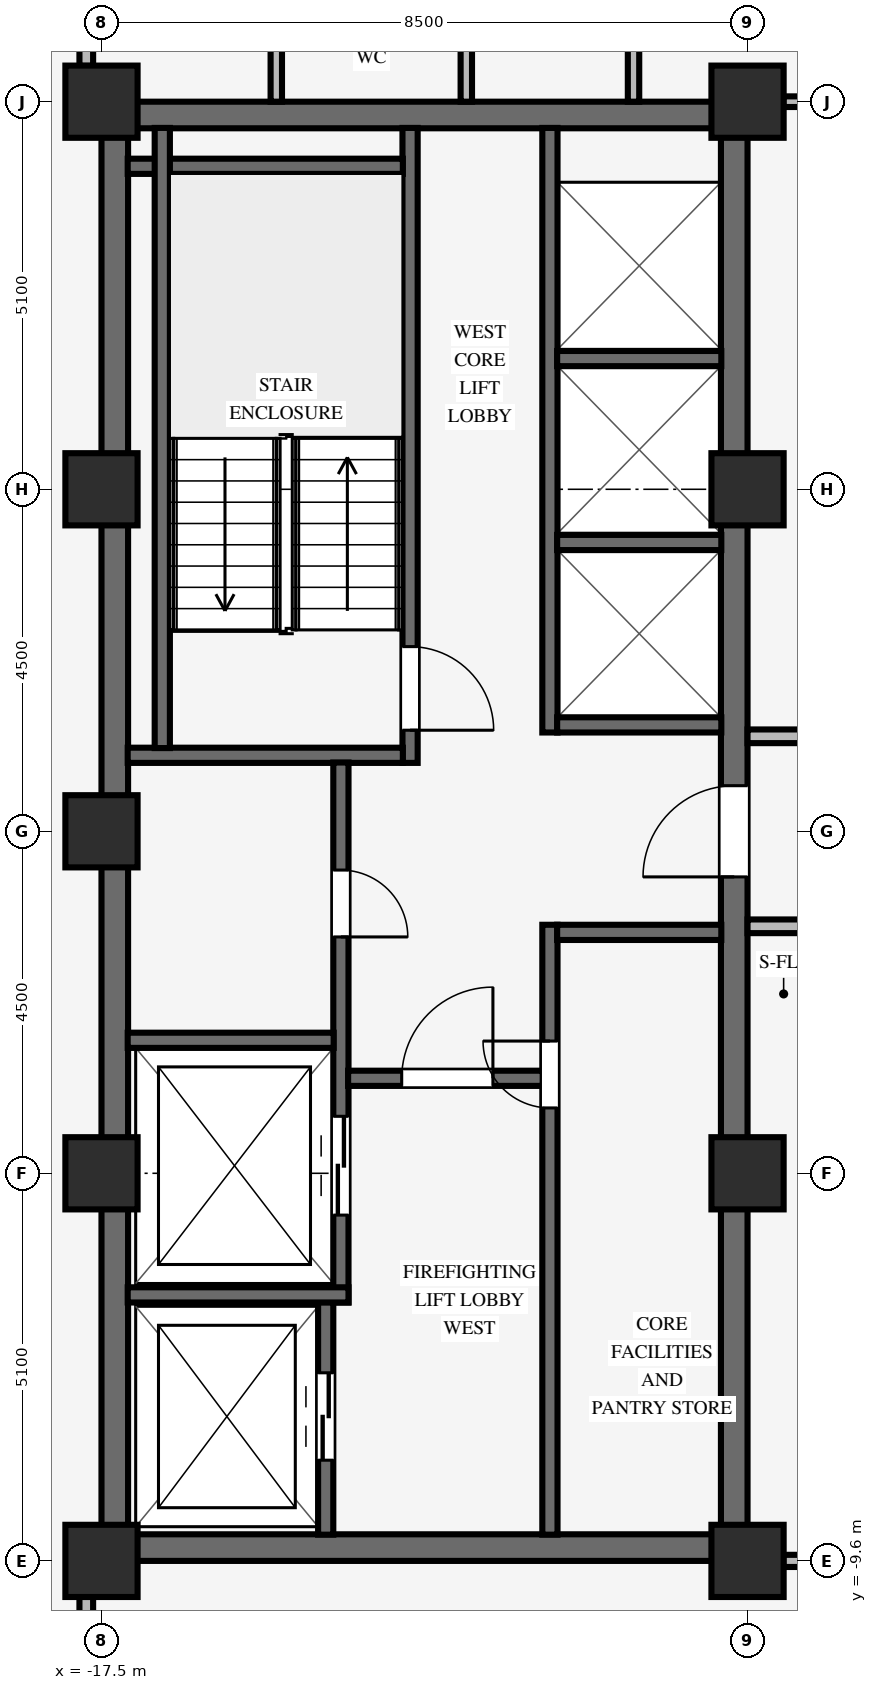
"""IFC4 building model, lengths in metres.
Left out: names, types, materials, properties, quantities, classifications, styles, units other than length and angle.
Written with IfcOpenShell. Run it as: python <this file> out.ifc"""

import sys

from ifc_helpers import new_model, si_unit, direction, frame, frame_2d, origin, origin_2d, place, context, subcontext, project, spatial, rectangle, extrude, source, transform, mapped, element, fill, save


model = new_model("IFC4")
c1 = context("Model", 3, precision=1e-05, world=origin(), true_north=direction((0.0, 1.0)))
c2 = subcontext(c1, "Body", "Model", "MODEL_VIEW")
j1 = project(units=[si_unit("LENGTHUNIT", "METRE"), si_unit("PLANEANGLEUNIT", "RADIAN")], contexts=[c1])
p1 = place(None, origin())
s1 = spatial("IfcSite", under=j1, at=p1, CompositionType="ELEMENT")
p2 = place(p1, origin())
s2 = spatial("IfcBuilding", under=s1, at=p2, CompositionType="ELEMENT")
p3 = place(p2, frame((0.0, 0.0, 198.2)))
s3 = spatial("IfcBuildingStorey", under=s2, at=p3, CompositionType="ELEMENT", Elevation=198.2)
for number, where, z_axis, x_axis in (
    (1, (-17.5, -9.425, 0.0), (0.0, 0.0, 1.0), (1.0, 0.0, 0.0)),
    (2, (-17.5, 9.425, 0.0), (0.0, 0.0, 1.0), (1.0, 0.0, 0.0)),
):
    element("IfcWall", number, at=place(p3, frame(where, z_axis=z_axis, x_axis=x_axis)), inside=s3, PredefinedType="SHEAR", context=c2, shape_type="SweptSolid", body=[
        extrude(rectangle(XDim=8.5, YDim=0.35, at=frame_2d((4.25, 0.0))), origin(), (0.0, 0.0, 1.0), 3.37),
    ])
p4 = place(p3, frame((-17.325, -9.255, 0.0), z_axis=(0.0, 0.0, 1.0), x_axis=(0.0, 1.0, 0.0)))
e3 = element("IfcWall", 3, at=p4, inside=s3, PredefinedType="SHEAR", context=c2, shape_type="SweptSolid", body=[
    extrude(rectangle(XDim=18.51, YDim=0.35, at=frame_2d((9.255, 0.0))), origin(), (0.0, 0.0, 1.0), 3.37),
])
p5 = place(p3, frame((-9.175, -9.255, 0.0), z_axis=(0.0, 0.0, 1.0), x_axis=(0.0, 1.0, 0.0)))
e4 = element("IfcWall", 4, at=p5, inside=s3, PredefinedType="SHEAR", context=c2, shape_type="SweptSolid", body=[
    extrude(rectangle(XDim=18.51, YDim=0.35, at=frame_2d((9.255, 0.0))), origin(), (0.0, 0.0, 1.0), 3.37),
])
p6 = place(p5, frame((8.655, 0.0, 0.0)))
e5 = element("IfcOpeningElement", 5, at=p6, cuts=e4, PredefinedType="OPENING", context=c2, shape_type="SweptSolid", body=[
    extrude(rectangle(XDim=1.2, YDim=2.15, at=frame_2d((0.6, 1.075))), frame((0.0, 0.185, 0.0), z_axis=(0.0, -1.0, 0.0), x_axis=(1.0, 0.0, 0.0)), (0.0, 0.0, 1.0), 0.37),
])
for number, where, z_axis, x_axis in (
    (6, (-17.5, -9.6, 0.0), (0.0, 0.0, 1.0), (1.0, 0.0, 0.0)),
    (7, (-17.5, -4.5, 0.0), (0.0, 0.0, 1.0), (1.0, 0.0, 0.0)),
    (8, (-17.5, 4.5, 0.0), (0.0, 0.0, 1.0), (1.0, 0.0, 0.0)),
    (9, (-17.5, 9.6, 0.0), (0.0, 0.0, 1.0), (1.0, 0.0, 0.0)),
    (10, (-9.0, -9.6, 0.0), (0.0, 0.0, 1.0), (1.0, 0.0, 0.0)),
    (11, (-9.0, -4.5, 0.0), (0.0, 0.0, 1.0), (1.0, 0.0, 0.0)),
    (12, (-9.0, 4.5, 0.0), (0.0, 0.0, 1.0), (1.0, 0.0, 0.0)),
    (13, (-9.0, 9.6, 0.0), (0.0, 0.0, 1.0), (1.0, 0.0, 0.0)),
    (14, (-17.5, 0.0, 0.0), (0.0, 0.0, 1.0), (1.0, 0.0, 0.0)),
):
    element("IfcColumn", number, at=place(p3, frame(where, z_axis=z_axis, x_axis=x_axis)), inside=s3, PredefinedType="COLUMN", context=c2, shape_type="SweptSolid", body=[
        extrude(rectangle(XDim=0.95, YDim=0.95, at=origin_2d()), origin(), (0.0, 0.0, 1.0), 3.37),
    ])
p7 = place(p3, frame((-13.44, 0.9, 0.0), z_axis=(0.0, 0.0, 1.0), x_axis=(0.0, 1.0, 0.0)))
e15 = element("IfcWall", 15, at=p7, inside=s3, PredefinedType="SHEAR", context=c2, shape_type="SweptSolid", body=[
    extrude(rectangle(XDim=8.355, YDim=0.2, at=frame_2d((4.177, 0.0))), origin(), (0.0, 0.0, 1.0), 3.37),
])
p8 = place(p7, frame((1.53, 0.0, 0.0), z_axis=(0.0, 0.0, 1.0), x_axis=(-1.0, 0.0, 0.0)))
e16 = element("IfcOpeningElement", 16, at=p8, cuts=e15, PredefinedType="OPENING", context=c2, shape_type="SweptSolid", body=[
    extrude(rectangle(XDim=1.1, YDim=2.15, at=frame_2d((0.55, 1.075))), frame((0.0, 0.11, 0.0), z_axis=(0.0, -1.0, 0.0), x_axis=(1.0, 0.0, 0.0)), (0.0, 0.0, 1.0), 0.22),
])
for number, where, z_axis, x_axis in (
    (17, (-17.155, 1.0, 0.0), (0.0, 0.0, 1.0), (1.0, 0.0, 0.0)),
    (18, (-17.155, 8.75, 0.0), (0.0, 0.0, 1.0), (1.0, 0.0, 0.0)),
):
    element("IfcWall", number, at=place(p3, frame(where, z_axis=z_axis, x_axis=x_axis)), inside=s3, PredefinedType="SHEAR", context=c2, shape_type="SweptSolid", body=[
        extrude(rectangle(XDim=3.62, YDim=0.2, at=frame_2d((1.81, 0.0))), origin(), (0.0, 0.0, 1.0), 3.37),
    ])
p9 = place(p3, frame((-16.7, 1.095, 0.0), z_axis=(0.0, 0.0, 1.0), x_axis=(0.0, 1.0, 0.0)))
e19 = element("IfcWall", 19, at=p9, inside=s3, PredefinedType="SHEAR", context=c2, shape_type="SweptSolid", body=[
    extrude(rectangle(XDim=8.16, YDim=0.2, at=frame_2d((4.08, 0.0))), origin(), (0.0, 0.0, 1.0), 3.37),
])
p10 = place(p3, frame((-14.55, -9.255, 0.0), z_axis=(0.0, 0.0, 1.0), x_axis=(0.0, 1.0, 0.0)))
e20 = element("IfcWall", 20, at=p10, inside=s3, PredefinedType="SHEAR", context=c2, shape_type="SweptSolid", body=[
    extrude(rectangle(XDim=3.06, YDim=0.2, at=frame_2d((1.53, 0.0))), origin(), (0.0, 0.0, 1.0), 3.37),
])
p11 = place(p10, frame((0.98, 0.0, 0.0)))
e21 = element("IfcOpeningElement", 21, at=p11, cuts=e20, PredefinedType="OPENING", context=c2, shape_type="SweptSolid", body=[
    extrude(rectangle(XDim=1.15, YDim=2.15, at=frame_2d((0.575, 1.075))), frame((0.0, 0.11, 0.0), z_axis=(0.0, -1.0, 0.0), x_axis=(1.0, 0.0, 0.0)), (0.0, 0.0, 1.0), 0.22),
])
p12 = place(p3, frame((-14.35, -6.2, 0.0), z_axis=(0.0, 0.0, 1.0), x_axis=(0.0, 1.0, 0.0)))
e22 = element("IfcWall", 22, at=p12, inside=s3, PredefinedType="SHEAR", context=c2, shape_type="SweptSolid", body=[
    extrude(rectangle(XDim=7.105, YDim=0.2, at=frame_2d((3.552, 0.0))), origin(), (0.0, 0.0, 1.0), 3.37),
])
p13 = place(p12, frame((5.69, 0.0, 0.0), z_axis=(0.0, 0.0, 1.0), x_axis=(-1.0, 0.0, 0.0)))
e23 = element("IfcOpeningElement", 23, at=p13, cuts=e22, PredefinedType="OPENING", context=c2, shape_type="SweptSolid", body=[
    extrude(rectangle(XDim=0.88, YDim=2.1, at=frame_2d((0.44, 1.05))), frame((0.0, 0.11, 0.0), z_axis=(0.0, -1.0, 0.0), x_axis=(1.0, 0.0, 0.0)), (0.0, 0.0, 1.0), 0.22),
])
p14 = place(p12, frame((1.15, 0.0, 0.0)))
e24 = element("IfcOpeningElement", 24, at=p14, cuts=e22, PredefinedType="OPENING", context=c2, shape_type="SweptSolid", body=[
    extrude(rectangle(XDim=1.3, YDim=2.2, at=frame_2d((0.65, 1.1))), frame((0.0, 0.11, 0.0), z_axis=(0.0, -1.0, 0.0), x_axis=(1.0, 0.0, 0.0)), (0.0, 0.0, 1.0), 0.22),
])
p15 = place(p3, frame((-17.155, -6.1, 0.0), z_axis=(0.0, 0.0, 1.0), x_axis=(1.0, 0.0, 0.0)))
e25 = element("IfcWall", 25, at=p15, inside=s3, PredefinedType="SHEAR", context=c2, shape_type="SweptSolid", body=[
    extrude(rectangle(XDim=2.905, YDim=0.2, at=frame_2d((1.453, 0.0))), origin(), (0.0, 0.0, 1.0), 3.37),
])
p16 = place(p3, frame((-17.155, -2.75, 0.0), z_axis=(0.0, 0.0, 1.0), x_axis=(1.0, 0.0, 0.0)))
e26 = element("IfcWall", 26, at=p16, inside=s3, PredefinedType="SHEAR", context=c2, shape_type="SweptSolid", body=[
    extrude(rectangle(XDim=2.71, YDim=0.2, at=frame_2d((1.355, 0.0))), origin(), (0.0, 0.0, 1.0), 3.37),
])
p17 = place(p3, frame((-11.6, -9.255, 0.0), z_axis=(0.0, 0.0, 1.0), x_axis=(0.0, 1.0, 0.0)))
e27 = element("IfcWall", 27, at=p17, inside=s3, PredefinedType="SHEAR", context=c2, shape_type="SweptSolid", body=[
    extrude(rectangle(XDim=8.025, YDim=0.2, at=frame_2d((4.012, 0.0))), origin(), (0.0, 0.0, 1.0), 3.37),
])
p18 = place(p17, frame((5.615, 0.0, 0.0)))
e28 = element("IfcOpeningElement", 28, at=p18, cuts=e27, PredefinedType="OPENING", context=c2, shape_type="SweptSolid", body=[
    extrude(rectangle(XDim=0.88, YDim=2.1, at=frame_2d((0.44, 1.05))), frame((0.0, 0.11, 0.0), z_axis=(0.0, -1.0, 0.0), x_axis=(1.0, 0.0, 0.0)), (0.0, 0.0, 1.0), 0.22),
])
p19 = place(p3, frame((-14.255, -3.25, 0.0), z_axis=(0.0, 0.0, 1.0), x_axis=(1.0, 0.0, 0.0)))
e29 = element("IfcWall", 29, at=p19, inside=s3, PredefinedType="SHEAR", context=c2, shape_type="SweptSolid", body=[
    extrude(rectangle(XDim=2.56, YDim=0.2, at=frame_2d((1.28, 0.0))), origin(), (0.0, 0.0, 1.0), 3.37),
])
p20 = place(p19, frame((0.705, 0.0, 0.0)))
e30 = element("IfcOpeningElement", 30, at=p20, cuts=e29, PredefinedType="OPENING", context=c2, shape_type="SweptSolid", body=[
    extrude(rectangle(XDim=1.2, YDim=2.15, at=frame_2d((0.6, 1.075))), frame((0.0, 0.11, 0.0), z_axis=(0.0, -1.0, 0.0), x_axis=(1.0, 0.0, 0.0)), (0.0, 0.0, 1.0), 0.22),
])
p21 = place(p3, frame((-11.505, -1.33, 0.0), z_axis=(0.0, 0.0, 1.0), x_axis=(1.0, 0.0, 0.0)))
e31 = element("IfcWall", 31, at=p21, inside=s3, PredefinedType="SHEAR", context=c2, shape_type="SweptSolid", body=[
    extrude(rectangle(XDim=2.16, YDim=0.2, at=frame_2d((1.08, 0.0))), origin(), (0.0, 0.0, 1.0), 3.37),
])
p22 = place(p3, frame((-11.6, 1.3, 0.0), z_axis=(0.0, 0.0, 1.0), x_axis=(0.0, 1.0, 0.0)))
e32 = element("IfcWall", 32, at=p22, inside=s3, PredefinedType="SHEAR", context=c2, shape_type="SweptSolid", body=[
    extrude(rectangle(XDim=7.955, YDim=0.2, at=frame_2d((3.978, 0.0))), origin(), (0.0, 0.0, 1.0), 3.37),
])
for number, where, z_axis, x_axis in (
    (33, (-11.505, 1.4, 0.0), (0.0, 0.0, 1.0), (1.0, 0.0, 0.0)),
    (34, (-11.505, 3.8, 0.0), (0.0, 0.0, 1.0), (1.0, 0.0, 0.0)),
    (35, (-11.505, 6.22, 0.0), (0.0, 0.0, 1.0), (1.0, 0.0, 0.0)),
):
    element("IfcWall", number, at=place(p3, frame(where, z_axis=z_axis, x_axis=x_axis)), inside=s3, PredefinedType="SHEAR", context=c2, shape_type="SweptSolid", body=[
        extrude(rectangle(XDim=2.16, YDim=0.2, at=frame_2d((1.08, 0.0))), origin(), (0.0, 0.0, 1.0), 3.37),
    ])
p23 = place(p3, frame((-8.529, -9.6, 0.0), z_axis=(0.0, 0.0, 1.0), x_axis=(1.0, 0.0, 0.0)))
e36 = element("IfcWall", 36, at=p23, inside=s3, PredefinedType="PARTITIONING", context=c2, shape_type="SweptSolid", body=[
    extrude(rectangle(XDim=8.378, YDim=0.16, at=frame_2d((4.189, 0.0))), origin(), (0.0, 0.0, 1.0), 2.405),
])
p24 = place(p3, frame((-9.0, -1.25, 0.0), z_axis=(0.0, 0.0, 1.0), x_axis=(1.0, 0.0, 0.0)))
e37 = element("IfcWall", 37, at=p24, inside=s3, PredefinedType="PARTITIONING", context=c2, shape_type="SweptSolid", body=[
    extrude(rectangle(XDim=15.6, YDim=0.18, at=frame_2d((7.8, 0.0))), origin(), (0.0, 0.0, 1.0), 3.36),
])
p25 = place(p24, frame((5.42, 0.0, 0.0)))
e38 = element("IfcOpeningElement", 38, at=p25, cuts=e37, PredefinedType="OPENING", context=c2, shape_type="SweptSolid", body=[
    extrude(rectangle(XDim=0.96, YDim=2.1, at=frame_2d((0.48, 1.05))), frame((0.0, 0.1, 0.0), z_axis=(0.0, -1.0, 0.0), x_axis=(1.0, 0.0, 0.0)), (0.0, 0.0, 1.0), 0.2),
])
p26 = place(p3, frame((-9.0, 1.25, 0.0), z_axis=(0.0, 0.0, 1.0), x_axis=(1.0, 0.0, 0.0)))
e39 = element("IfcWall", 39, at=p26, inside=s3, PredefinedType="PARTITIONING", context=c2, shape_type="SweptSolid", body=[
    extrude(rectangle(XDim=15.6, YDim=0.18, at=frame_2d((7.8, 0.0))), origin(), (0.0, 0.0, 1.0), 3.36),
])
p27 = place(p26, frame((10.42, 0.0, 0.0)))
e40 = element("IfcOpeningElement", 40, at=p27, cuts=e39, PredefinedType="OPENING", context=c2, shape_type="SweptSolid", body=[
    extrude(rectangle(XDim=0.96, YDim=2.1, at=frame_2d((0.48, 1.05))), frame((0.0, 0.1, 0.0), z_axis=(0.0, -1.0, 0.0), x_axis=(1.0, 0.0, 0.0)), (0.0, 0.0, 1.0), 0.2),
])
p28 = place(p26, frame((2.62, 0.0, 0.0)))
e41 = element("IfcOpeningElement", 41, at=p28, cuts=e39, PredefinedType="OPENING", context=c2, shape_type="SweptSolid", body=[
    extrude(rectangle(XDim=0.96, YDim=2.1, at=frame_2d((0.48, 1.05))), frame((0.0, 0.1, 0.0), z_axis=(0.0, -1.0, 0.0), x_axis=(1.0, 0.0, 0.0)), (0.0, 0.0, 1.0), 0.2),
])
p29 = place(p3, frame((-8.529, 9.6, 0.0), z_axis=(0.0, 0.0, 1.0), x_axis=(1.0, 0.0, 0.0)))
e42 = element("IfcWall", 42, at=p29, inside=s3, PredefinedType="PARTITIONING", context=c2, shape_type="SweptSolid", body=[
    extrude(rectangle(XDim=8.378, YDim=0.14, at=frame_2d((4.189, 0.0))), origin(), (0.0, 0.0, 1.0), 2.405),
])
p30 = place(p3, frame((-17.7, -13.414, 0.0), z_axis=(0.0, 0.0, 1.0), x_axis=(0.0, 1.0, 0.0)))
e43 = element("IfcWall", 43, at=p30, inside=s3, PredefinedType="PARTITIONING", context=c2, shape_type="SweptSolid", body=[
    extrude(rectangle(XDim=3.343, YDim=0.18, at=frame_2d((1.671, 0.0))), origin(), (0.0, 0.0, 1.0), 2.816),
])
p31 = place(p3, frame((-17.7, 10.071, 0.0), z_axis=(0.0, 0.0, 1.0), x_axis=(0.0, 1.0, 0.0)))
e44 = element("IfcWall", 44, at=p31, inside=s3, PredefinedType="PARTITIONING", context=c2, shape_type="SweptSolid", body=[
    extrude(rectangle(XDim=3.343, YDim=0.18, at=frame_2d((1.671, 0.0))), origin(), (0.0, 0.0, 1.0), 2.816),
])
p32 = place(p31, frame((1.221, 0.0, 0.0)))
e45 = element("IfcOpeningElement", 45, at=p32, cuts=e44, PredefinedType="OPENING", context=c2, shape_type="SweptSolid", body=[
    extrude(rectangle(XDim=0.9, YDim=2.1, at=frame_2d((0.45, 1.05))), frame((0.0, 0.1, 0.0), z_axis=(0.0, -1.0, 0.0), x_axis=(1.0, 0.0, 0.0)), (0.0, 0.0, 1.0), 0.2),
])
for number, where, z_axis, x_axis in (
    (46, (-15.2, 9.6, 0.0), (0.0, 0.0, 1.0), (0.0, 1.0, 0.0)),
    (47, (-12.7, 9.6, 0.0), (0.0, 0.0, 1.0), (0.0, 1.0, 0.0)),
    (48, (-10.5, 9.6, 0.0), (0.0, 0.0, 1.0), (0.0, 1.0, 0.0)),
):
    element("IfcWall", number, at=place(p3, frame(where, z_axis=z_axis, x_axis=x_axis)), inside=s3, PredefinedType="PARTITIONING", context=c2, shape_type="SweptSolid", body=[
        extrude(rectangle(XDim=3.814, YDim=0.15, at=frame_2d((1.907, 0.0))), origin(), (0.0, 0.0, 1.0), 3.36),
    ])
m1 = source(origin(), c2, "Body", "SweptSolid", [
    extrude(rectangle(XDim=1.1, YDim=2.15, at=frame_2d((0.55, 1.075))), frame((0.0, 0.025, 0.0), z_axis=(0.0, -1.0, 0.0), x_axis=(1.0, 0.0, 0.0)), (0.0, 0.0, 1.0), 0.05),
])
p33 = place(p8, origin())
e49 = element("IfcDoor", 49, at=p33, inside=s3, OperationType="SINGLE_SWING_RIGHT", PredefinedType="DOOR", context=c2, shape_type="MappedRepresentation", body=[
    mapped(m1, transform((0.0, 0.0, 0.0), scale=1.0)),
])
fill(e16, e49)
m2 = source(origin(), c2, "Body", "SweptSolid", [
    extrude(rectangle(XDim=0.88, YDim=2.1, at=frame_2d((0.44, 1.05))), frame((0.0, 0.025, 0.0), z_axis=(0.0, -1.0, 0.0), x_axis=(1.0, 0.0, 0.0)), (0.0, 0.0, 1.0), 0.05),
])
p34 = place(p13, origin())
e50 = element("IfcDoor", 50, at=p34, inside=s3, OperationType="SINGLE_SWING_RIGHT", PredefinedType="DOOR", context=c2, shape_type="MappedRepresentation", body=[
    mapped(m2, transform((0.0, 0.0, 0.0), scale=1.0)),
])
fill(e23, e50)
m3 = source(origin(), c2, "Body", "SweptSolid", [
    extrude(rectangle(XDim=1.2, YDim=2.15, at=frame_2d((0.6, 1.075))), frame((0.0, 0.025, 0.0), z_axis=(0.0, -1.0, 0.0), x_axis=(1.0, 0.0, 0.0)), (0.0, 0.0, 1.0), 0.05),
])
p35 = place(p20, origin())
e51 = element("IfcDoor", 51, at=p35, inside=s3, OperationType="SINGLE_SWING_RIGHT", PredefinedType="DOOR", context=c2, shape_type="MappedRepresentation", body=[
    mapped(m3, transform((0.0, 0.0, 0.0), scale=1.0)),
])
fill(e30, e51)
p36 = place(p18, origin())
e52 = element("IfcDoor", 52, at=p36, inside=s3, OperationType="SINGLE_SWING_RIGHT", PredefinedType="DOOR", context=c2, shape_type="MappedRepresentation", body=[
    mapped(m2, transform((0.0, 0.0, 0.0), scale=1.0)),
])
fill(e28, e52)
p37 = place(p6, origin())
e53 = element("IfcDoor", 53, at=p37, inside=s3, OperationType="SINGLE_SWING_LEFT", PredefinedType="DOOR", context=c2, shape_type="MappedRepresentation", body=[
    mapped(m3, transform((0.0, 0.0, 0.0), scale=1.0)),
])
fill(e5, e53)
m4 = source(origin(), c2, "Body", "SweptSolid", [
    extrude(rectangle(XDim=1.15, YDim=2.15, at=frame_2d((0.575, 1.075))), frame((0.0, 0.025, 0.0), z_axis=(0.0, -1.0, 0.0), x_axis=(1.0, 0.0, 0.0)), (0.0, 0.0, 1.0), 0.05),
])
p38 = place(p11, origin())
e54 = element("IfcDoor", 54, at=p38, inside=s3, OperationType="DOUBLE_DOOR_SLIDING", PredefinedType="DOOR", context=c2, shape_type="MappedRepresentation", body=[
    mapped(m4, transform((0.0, 0.0, 0.0), scale=1.0)),
])
fill(e21, e54)
m5 = source(origin(), c2, "Body", "SweptSolid", [
    extrude(rectangle(XDim=1.3, YDim=2.2, at=frame_2d((0.65, 1.1))), frame((0.0, 0.025, 0.0), z_axis=(0.0, -1.0, 0.0), x_axis=(1.0, 0.0, 0.0)), (0.0, 0.0, 1.0), 0.05),
])
p39 = place(p14, origin())
e55 = element("IfcDoor", 55, at=p39, inside=s3, OperationType="DOUBLE_DOOR_SLIDING", PredefinedType="DOOR", context=c2, shape_type="MappedRepresentation", body=[
    mapped(m5, transform((0.0, 0.0, 0.0), scale=1.0)),
])
fill(e24, e55)
save(model, sys.argv[1])
